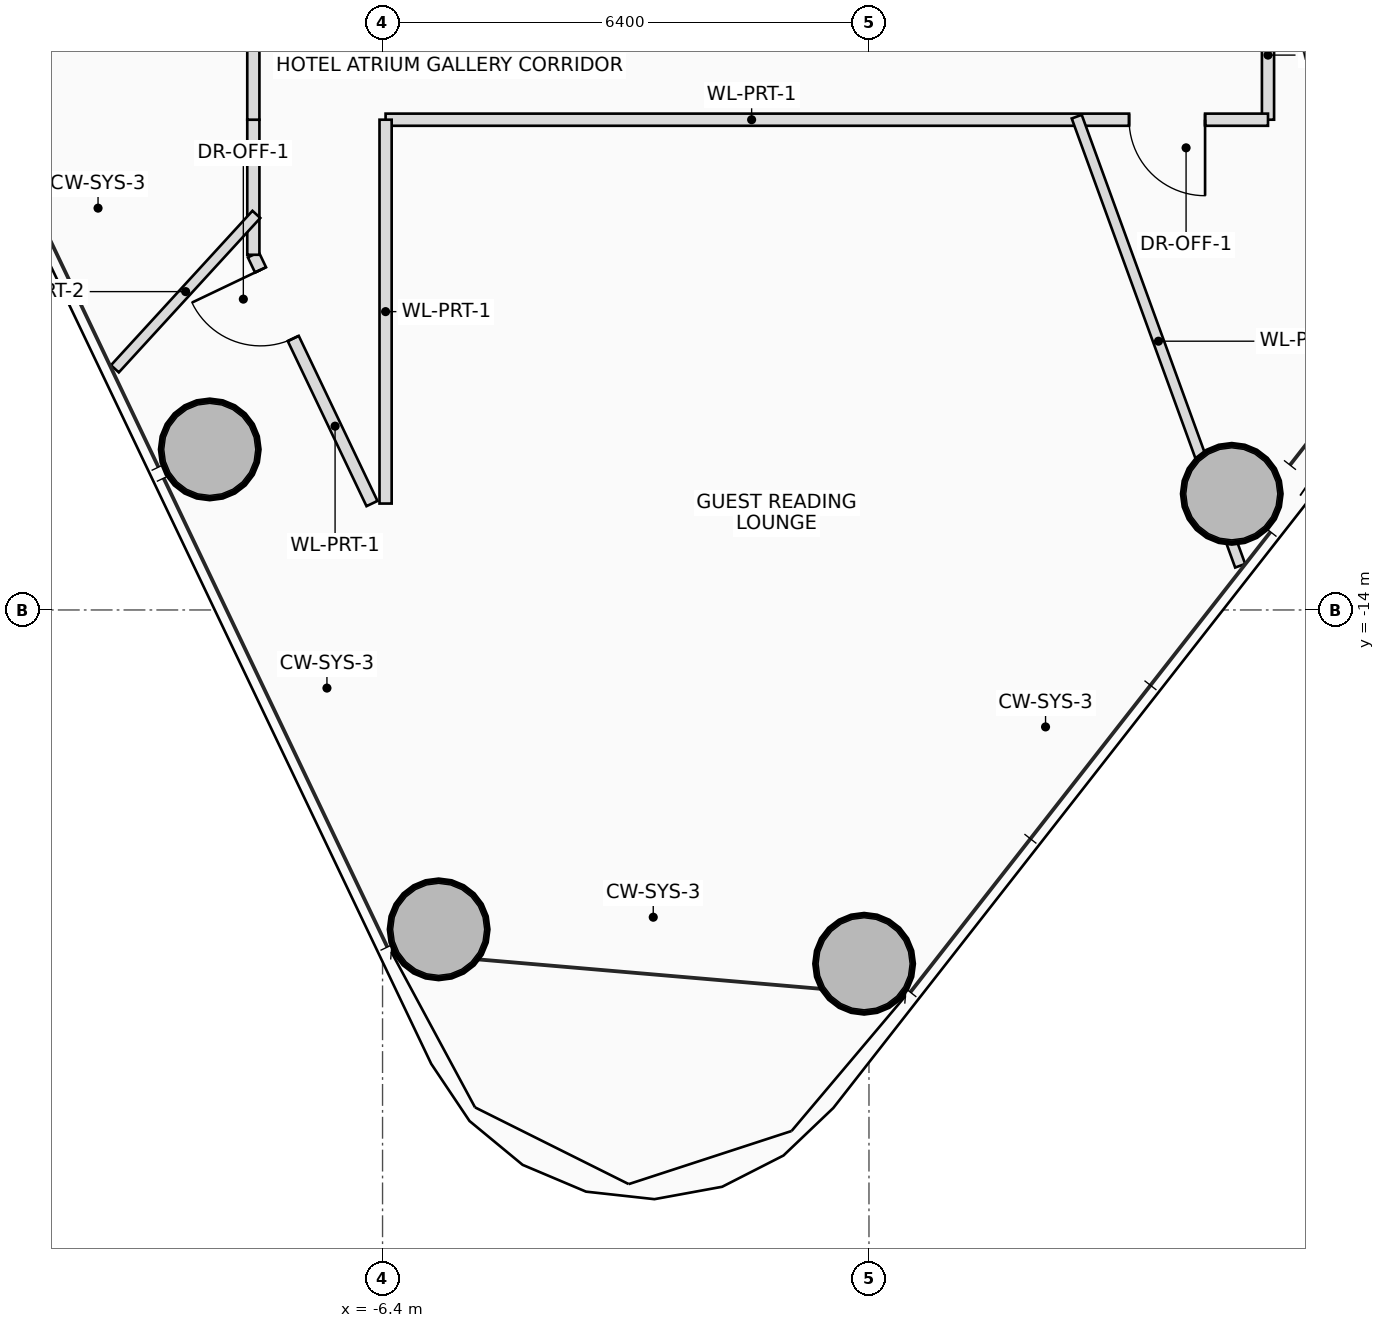
"""IFC4 building model, lengths in metres.
Left out: names, types, materials, properties, quantities, classifications, styles, units other than length and angle.
Written with IfcOpenShell. Run it as: python <this file> out.ifc"""

import sys

from ifc_helpers import new_model, si_unit, direction, frame, frame_2d, origin, origin_2d, place, context, subcontext, project, spatial, rectangle, hollow_circle, extrude, source, transform, mapped, element, fill, save


model = new_model("IFC4")
c1 = context("Model", 3, precision=1e-05, world=origin(), true_north=direction((0.0, 1.0)))
c2 = subcontext(c1, "Body", "Model", "MODEL_VIEW")
j1 = project(units=[si_unit("LENGTHUNIT", "METRE"), si_unit("PLANEANGLEUNIT", "RADIAN")], contexts=[c1])
p1 = place(None, origin())
s1 = spatial("IfcSite", under=j1, at=p1, CompositionType="ELEMENT")
p2 = place(p1, origin())
s2 = spatial("IfcBuilding", under=s1, at=p2, CompositionType="ELEMENT")
p3 = place(p2, frame((0.0, 0.0, 136.4)))
s3 = spatial("IfcBuildingStorey", under=s2, at=p3, CompositionType="ELEMENT", Elevation=136.4)
m1 = source(origin(), c2, "Body", "SweptSolid", [
    extrude(hollow_circle(Radius=0.65, WallThickness=0.045, at=origin_2d()), origin(), (0.0, 0.0, 1.0), 3.45),
])
for number, where, z_axis, x_axis in (
    (1, (-0.064, -18.655, 0.0), (0.0, 0.0, 1.0), (1.0, 0.0, 0.0)),
    (2, (4.773, -12.472, 0.0), (0.0, 0.0, 1.0), (1.0, 0.0, 0.0)),
    (3, (-8.674, -11.888, 0.0), (0.0, 0.0, 1.0), (1.0, 0.0, 0.0)),
    (4, (-5.662, -18.202, 0.0), (0.0, 0.0, 1.0), (1.0, 0.0, 0.0)),
):
    element("IfcColumn", number, at=place(p3, frame(where, z_axis=z_axis, x_axis=x_axis)), inside=s3, PredefinedType="COLUMN", context=c2, shape_type="MappedRepresentation", body=[
        mapped(m1, transform((0.0, 0.0, 0.0), scale=1.0)),
    ])
p4 = place(p3, frame((-6.539, -12.6, 0.0), z_axis=(0.0, 0.0, 1.0), x_axis=(-0.430521464151, 0.902580339308, 0.0)))
e5 = element("IfcWall", 5, at=p4, inside=s3, PredefinedType="PARTITIONING", context=c2, shape_type="SweptSolid", body=[
    extrude(rectangle(XDim=3.626, YDim=0.16, at=frame_2d((1.813, 0.0))), origin(), (0.0, 0.0, 1.0), 2.605),
])
p5 = place(p4, frame((2.406, 0.0, 0.0)))
e6 = element("IfcOpeningElement", 6, at=p5, cuts=e5, PredefinedType="OPENING", context=c2, shape_type="SweptSolid", body=[
    extrude(rectangle(XDim=1.0, YDim=2.25, at=frame_2d((0.5, 1.125))), frame((0.0, 0.09, 0.0), z_axis=(0.0, -1.0, 0.0), x_axis=(1.0, 0.0, 0.0)), (0.0, 0.0, 1.0), 0.18),
])
p6 = place(p3, frame((-8.1, -9.327, 0.0), z_axis=(0.0, 0.0, 1.0), x_axis=(0.0, 1.0, 0.0)))
e7 = element("IfcWall", 7, at=p6, inside=s3, PredefinedType="PARTITIONING", context=c2, shape_type="SweptSolid", body=[
    extrude(rectangle(XDim=1.777, YDim=0.16, at=frame_2d((0.888, 0.0))), origin(), (0.0, 0.0, 1.0), 3.25),
])
p7 = place(p3, frame((-8.1, -7.55, 0.0), z_axis=(0.0, 0.0, 1.0), x_axis=(0.0, 1.0, 0.0)))
e8 = element("IfcWall", 8, at=p7, inside=s3, PredefinedType="PARTITIONING", context=c2, shape_type="SweptSolid", body=[
    extrude(rectangle(XDim=15.1, YDim=0.16, at=frame_2d((7.55, 0.0))), origin(), (0.0, 0.0, 1.0), 2.605),
])
p8 = place(p7, frame((2.989, 0.0, 0.0)))
e9 = element("IfcOpeningElement", 9, at=p8, cuts=e8, PredefinedType="OPENING", context=c2, shape_type="SweptSolid", body=[
    extrude(rectangle(XDim=0.9, YDim=2.05, at=frame_2d((0.45, 1.025))), frame((0.0, 0.09, 0.0), z_axis=(0.0, -1.0, 0.0), x_axis=(1.0, 0.0, 0.0)), (0.0, 0.0, 1.0), 0.18),
])
p9 = place(p7, frame((10.301, 0.0, 0.0)))
e10 = element("IfcOpeningElement", 10, at=p9, cuts=e8, PredefinedType="OPENING", context=c2, shape_type="SweptSolid", body=[
    extrude(rectangle(XDim=1.0, YDim=2.25, at=frame_2d((0.5, 1.125))), frame((0.0, 0.09, 0.0), z_axis=(0.0, -1.0, 0.0), x_axis=(1.0, 0.0, 0.0)), (0.0, 0.0, 1.0), 0.18),
])
p10 = place(p3, frame((5.25, -5.85, 0.0), z_axis=(0.0, 0.0, 1.0), x_axis=(0.0, -1.0, 0.0)))
e11 = element("IfcWall", 11, at=p10, inside=s3, PredefinedType="PARTITIONING", context=c2, shape_type="SweptSolid", body=[
    extrude(rectangle(XDim=1.7, YDim=0.16, at=frame_2d((0.85, 0.0))), origin(), (0.0, 0.0, 1.0), 3.25),
])
p11 = place(p3, frame((5.25, -7.55, 0.0), z_axis=(0.0, 0.0, 1.0), x_axis=(-1.0, 0.0, 0.0)))
e12 = element("IfcWall", 12, at=p11, inside=s3, PredefinedType="PARTITIONING", context=c2, shape_type="SweptSolid", body=[
    extrude(rectangle(XDim=11.61, YDim=0.16, at=frame_2d((5.805, 0.0))), origin(), (0.0, 0.0, 1.0), 2.605),
])
p12 = place(p11, frame((0.828, 0.0, 0.0)))
e13 = element("IfcOpeningElement", 13, at=p12, cuts=e12, PredefinedType="OPENING", context=c2, shape_type="SweptSolid", body=[
    extrude(rectangle(XDim=1.0, YDim=2.25, at=frame_2d((0.5, 1.125))), frame((0.0, 0.09, 0.0), z_axis=(0.0, -1.0, 0.0), x_axis=(1.0, 0.0, 0.0)), (0.0, 0.0, 1.0), 0.18),
])
p13 = place(p3, frame((-6.36, -7.55, 0.0), z_axis=(0.0, 0.0, 1.0), x_axis=(0.0, -1.0, 0.0)))
e14 = element("IfcWall", 14, at=p13, inside=s3, PredefinedType="PARTITIONING", context=c2, shape_type="SweptSolid", body=[
    extrude(rectangle(XDim=5.05, YDim=0.16, at=frame_2d((2.525, 0.0))), origin(), (0.0, 0.0, 1.0), 3.25),
])
p14 = place(p3, frame((-8.06, -8.796, 0.0), z_axis=(0.0, 0.0, 1.0), x_axis=(-0.67555207399, -0.737312278026, 0.0)))
e15 = element("IfcWall", 15, at=p14, inside=s3, PredefinedType="PARTITIONING", context=c2, shape_type="SweptSolid", body=[
    extrude(rectangle(XDim=2.755, YDim=0.14, at=frame_2d((1.378, 0.0))), origin(), (0.0, 0.0, 1.0), 2.765),
])
p15 = place(p3, frame((2.733, -7.51, 0.0), z_axis=(0.0, 0.0, 1.0), x_axis=(0.342029891784, -0.93968907258, 0.0)))
e16 = element("IfcWall", 16, at=p15, inside=s3, PredefinedType="PARTITIONING", context=c2, shape_type="SweptSolid", body=[
    extrude(rectangle(XDim=6.287, YDim=0.14, at=frame_2d((3.144, 0.0))), origin(), (0.0, 0.0, 1.0), 2.805),
])
p16 = place(p5, origin())
e17 = element("IfcDoor", 17, at=p16, inside=s3, OperationType="SINGLE_SWING_RIGHT", PredefinedType="DOOR", context=c2, shape_type="SweptSolid", body=[
    extrude(rectangle(XDim=1.0, YDim=2.25, at=frame_2d((0.5, 1.125))), frame((0.0, 0.025, 0.0), z_axis=(0.0, -1.0, 0.0), x_axis=(1.0, 0.0, 0.0)), (0.0, 0.0, 1.0), 0.05),
])
fill(e6, e17)
p17 = place(p12, origin())
e18 = element("IfcDoor", 18, at=p17, inside=s3, OperationType="SINGLE_SWING_LEFT", PredefinedType="DOOR", context=c2, shape_type="SweptSolid", body=[
    extrude(rectangle(XDim=1.0, YDim=2.25, at=frame_2d((0.5, 1.125))), frame((0.0, 0.025, 0.0), z_axis=(0.0, -1.0, 0.0), x_axis=(1.0, 0.0, 0.0)), (0.0, 0.0, 1.0), 0.05),
])
fill(e13, e18)
save(model, sys.argv[1])
